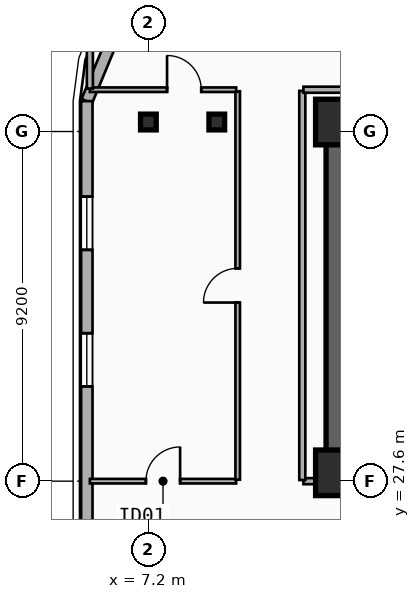
"""IFC4 building model, lengths in metres.
Left out: names, types, materials, properties, quantities, classifications, styles, units other than length and angle.
Written with IfcOpenShell. Run it as: python <this file> out.ifc"""

import sys

from ifc_helpers import new_model, si_unit, direction, frame, frame_2d, origin, origin_2d, place, context, subcontext, project, spatial, rectangle, i_section, extrude, element, fill, save


model = new_model("IFC4")
c1 = context("Model", 3, precision=1e-05, world=origin(), true_north=direction((0.0, 1.0)))
c2 = subcontext(c1, "Body", "Model", "MODEL_VIEW")
j1 = project(units=[si_unit("LENGTHUNIT", "METRE"), si_unit("PLANEANGLEUNIT", "RADIAN")], contexts=[c1])
p1 = place(None, origin())
s1 = spatial("IfcSite", under=j1, at=p1, CompositionType="ELEMENT")
p2 = place(p1, origin())
s2 = spatial("IfcBuilding", under=s1, at=p2, CompositionType="ELEMENT")
p3 = place(p2, frame((0.0, 0.0, 176.75)))
s3 = spatial("IfcBuildingStorey", under=s2, at=p3, CompositionType="ELEMENT", Elevation=176.75)
p4 = place(p3, frame((12.15, 37.05, 0.0), z_axis=(0.0, 0.0, 1.0), x_axis=(1.0, 0.0, 0.0)))
e1 = element("IfcWall", 1, at=p4, inside=s3, PredefinedType="SHEAR", context=c2, shape_type="SweptSolid", body=[
    extrude(rectangle(XDim=33.23, YDim=0.55, at=frame_2d((16.615, 0.0))), origin(), (0.0, 0.0, 1.0), 3.55),
])
p5 = place(p3, frame((21.18, 27.82, 0.0), z_axis=(0.0, 0.0, 1.0), x_axis=(-1.0, 0.0, 0.0)))
e2 = element("IfcWall", 2, at=p5, inside=s3, PredefinedType="SHEAR", context=c2, shape_type="SweptSolid", body=[
    extrude(rectangle(XDim=9.03, YDim=0.55, at=frame_2d((4.515, 0.0))), origin(), (0.0, 0.0, 1.0), 3.55),
])
p6 = place(p5, frame((2.68, 0.0, 0.0)))
e3 = element("IfcOpeningElement", 3, at=p6, cuts=e2, PredefinedType="OPENING", context=c2, shape_type="SweptSolid", body=[
    extrude(rectangle(XDim=1.1, YDim=2.15, at=frame_2d((0.55, 1.075))), frame((0.0, 0.285, 0.0), z_axis=(0.0, -1.0, 0.0), x_axis=(1.0, 0.0, 0.0)), (0.0, 0.0, 1.0), 0.57),
])
p7 = place(p3, frame((12.15, 28.095, 0.0), z_axis=(0.0, 0.0, 1.0), x_axis=(0.0, 1.0, 0.0)))
e4 = element("IfcWall", 4, at=p7, inside=s3, PredefinedType="SHEAR", context=c2, shape_type="SweptSolid", body=[
    extrude(rectangle(XDim=8.68, YDim=0.55, at=frame_2d((4.34, 0.0))), origin(), (0.0, 0.0, 1.0), 3.55),
])
for number, where, z_axis, x_axis in (
    (5, (12.2, 27.82, 0.0), (0.0, 0.0, 1.0), (1.0, 0.0, 0.0)),
    (6, (12.2, 37.05, 0.0), (0.0, 0.0, 1.0), (1.0, 0.0, 0.0)),
):
    element("IfcColumn", number, at=place(p3, frame(where, z_axis=z_axis, x_axis=x_axis)), inside=s3, PredefinedType="COLUMN", context=c2, shape_type="SweptSolid", body=[
        extrude(rectangle(XDim=1.2, YDim=1.2, at=origin_2d()), origin(), (0.0, 0.0, 1.0), 3.55),
    ])
for number, where, z_axis, x_axis in (
    (7, (9.0, 37.05, 0.0), (0.0, 0.0, 1.0), (1.0, 0.0, 0.0)),
    (8, (7.2, 37.05, 0.0), (0.0, 0.0, 1.0), (1.0, 0.0, 0.0)),
):
    element("IfcColumn", number, at=place(p3, frame(where, z_axis=z_axis, x_axis=x_axis)), inside=s3, PredefinedType="COLUMN", context=c2, shape_type="SweptSolid", body=[
        extrude(i_section(OverallWidth=0.413, OverallDepth=0.415, WebThickness=0.03, FlangeThickness=0.047, FilletRadius=0.015, at=origin_2d()), origin(), (0.0, 0.0, 1.0), 3.55),
    ])
p8 = place(p3, frame((5.58, 37.6, 0.0), z_axis=(0.0, 0.0, 1.0), x_axis=(0.382636798336, 0.92389884758, 0.0)))
e9 = element("IfcWall", 9, at=p8, inside=s3, PredefinedType="SOLIDWALL", context=c2, shape_type="SweptSolid", body=[
    extrude(rectangle(XDim=3.077, YDim=0.3, at=frame_2d((1.538, 0.0))), origin(), (0.0, 0.0, 1.0), 3.29),
])
p9 = place(p3, frame((5.58, 14.6, 0.0), z_axis=(0.0, 0.0, 1.0), x_axis=(0.0, 1.0, 0.0)))
e10 = element("IfcWall", 10, at=p9, inside=s3, PredefinedType="SOLIDWALL", context=c2, shape_type="SweptSolid", body=[
    extrude(rectangle(XDim=23.0, YDim=0.3, at=frame_2d((11.5, 0.0))), origin(), (0.0, 0.0, 1.0), 3.29),
])
p10 = place(p9, frame((15.493, 0.0, 0.34)))
e11 = element("IfcOpeningElement", 11, at=p10, cuts=e10, PredefinedType="OPENING", context=c2, shape_type="SweptSolid", body=[
    extrude(rectangle(XDim=1.4, YDim=2.1, at=frame_2d((0.7, 1.05))), frame((0.0, 0.16, 0.0), z_axis=(0.0, -1.0, 0.0), x_axis=(1.0, 0.0, 0.0)), (0.0, 0.0, 1.0), 0.32),
])
p11 = place(p9, frame((19.087, 0.0, 0.34)))
e12 = element("IfcOpeningElement", 12, at=p11, cuts=e10, PredefinedType="OPENING", context=c2, shape_type="SweptSolid", body=[
    extrude(rectangle(XDim=1.4, YDim=2.1, at=frame_2d((0.7, 1.05))), frame((0.0, 0.16, 0.0), z_axis=(0.0, -1.0, 0.0), x_axis=(1.0, 0.0, 0.0)), (0.0, 0.0, 1.0), 0.32),
])
p12 = place(p9, frame((2.83, 0.0, 0.34)))
e13 = element("IfcOpeningElement", 13, at=p12, cuts=e10, PredefinedType="OPENING", context=c2, shape_type="SweptSolid", body=[
    extrude(rectangle(XDim=1.4, YDim=2.1, at=frame_2d((0.7, 1.05))), frame((0.0, 0.16, 0.0), z_axis=(0.0, -1.0, 0.0), x_axis=(1.0, 0.0, 0.0)), (0.0, 0.0, 1.0), 0.32),
])
p13 = place(p9, frame((6.74, 0.0, 0.34)))
e14 = element("IfcOpeningElement", 14, at=p13, cuts=e10, PredefinedType="OPENING", context=c2, shape_type="SweptSolid", body=[
    extrude(rectangle(XDim=1.4, YDim=2.1, at=frame_2d((0.7, 1.05))), frame((0.0, 0.16, 0.0), z_axis=(0.0, -1.0, 0.0), x_axis=(1.0, 0.0, 0.0)), (0.0, 0.0, 1.0), 0.32),
])
p14 = place(p3, frame((5.66, 27.6, 0.0), z_axis=(0.0, 0.0, 1.0), x_axis=(1.0, 0.0, 0.0)))
e15 = element("IfcWall", 15, at=p14, inside=s3, PredefinedType="PARTITIONING", context=c2, shape_type="SweptSolid", body=[
    extrude(rectangle(XDim=3.85, YDim=0.12, at=frame_2d((1.925, 0.0))), origin(), (0.0, 0.0, 1.0), 2.62),
])
p15 = place(p14, frame((1.475, 0.0, 0.0)))
e16 = element("IfcOpeningElement", 16, at=p15, cuts=e15, PredefinedType="OPENING", context=c2, shape_type="SweptSolid", body=[
    extrude(rectangle(XDim=0.9, YDim=2.1, at=frame_2d((0.45, 1.05))), frame((0.0, 0.07, 0.0), z_axis=(0.0, -1.0, 0.0), x_axis=(1.0, 0.0, 0.0)), (0.0, 0.0, 1.0), 0.14),
])
p16 = place(p3, frame((9.55, 27.64, 0.0), z_axis=(0.0, 0.0, 1.0), x_axis=(0.0, 1.0, 0.0)))
e17 = element("IfcWall", 17, at=p16, inside=s3, PredefinedType="PARTITIONING", context=c2, shape_type="SweptSolid", body=[
    extrude(rectangle(XDim=10.22, YDim=0.12, at=frame_2d((5.11, 0.0))), origin(), (0.0, 0.0, 1.0), 2.77),
])
p17 = place(p16, frame((4.66, 0.0, 0.0)))
e18 = element("IfcOpeningElement", 18, at=p17, cuts=e17, PredefinedType="OPENING", context=c2, shape_type="SweptSolid", body=[
    extrude(rectangle(XDim=0.9, YDim=2.1, at=frame_2d((0.45, 1.05))), frame((0.0, 0.07, 0.0), z_axis=(0.0, -1.0, 0.0), x_axis=(1.0, 0.0, 0.0)), (0.0, 0.0, 1.0), 0.14),
])
p18 = place(p3, frame((5.66, 37.9, 0.0), z_axis=(0.0, 0.0, 1.0), x_axis=(1.0, 0.0, 0.0)))
e19 = element("IfcWall", 19, at=p18, inside=s3, PredefinedType="PARTITIONING", context=c2, shape_type="SweptSolid", body=[
    extrude(rectangle(XDim=3.85, YDim=0.12, at=frame_2d((1.925, 0.0))), origin(), (0.0, 0.0, 1.0), 3.29),
])
p19 = place(p18, frame((2.031, 0.0, 0.0)))
e20 = element("IfcOpeningElement", 20, at=p19, cuts=e19, PredefinedType="OPENING", context=c2, shape_type="SweptSolid", body=[
    extrude(rectangle(XDim=0.9, YDim=2.1, at=frame_2d((0.45, 1.05))), frame((0.0, 0.07, 0.0), z_axis=(0.0, -1.0, 0.0), x_axis=(1.0, 0.0, 0.0)), (0.0, 0.0, 1.0), 0.14),
])
p20 = place(p3, frame((11.28, 27.6, 0.0), z_axis=(0.0, 0.0, 1.0), x_axis=(1.0, 0.0, 0.0)))
e21 = element("IfcWall", 21, at=p20, inside=s3, PredefinedType="PARTITIONING", context=c2, shape_type="SweptSolid", body=[
    extrude(rectangle(XDim=0.84, YDim=0.16, at=frame_2d((0.42, 0.0))), origin(), (0.0, 0.0, 1.0), 2.36),
])
p21 = place(p3, frame((11.25, 27.63, 0.0), z_axis=(0.0, 0.0, 1.0), x_axis=(0.0, 1.0, 0.0)))
e22 = element("IfcWall", 22, at=p21, inside=s3, PredefinedType="PARTITIONING", context=c2, shape_type="SweptSolid", body=[
    extrude(rectangle(XDim=10.24, YDim=0.16, at=frame_2d((5.12, 0.0))), origin(), (0.0, 0.0, 1.0), 2.77),
])
p22 = place(p3, frame((11.28, 37.9, 0.0), z_axis=(0.0, 0.0, 1.0), x_axis=(1.0, 0.0, 0.0)))
e23 = element("IfcWall", 23, at=p22, inside=s3, PredefinedType="PARTITIONING", context=c2, shape_type="SweptSolid", body=[
    extrude(rectangle(XDim=35.04, YDim=0.16, at=frame_2d((17.52, 0.0))), origin(), (0.0, 0.0, 1.0), 3.29),
])
p23 = place(p3, frame((5.66, 37.93, 0.0), z_axis=(0.0, 0.0, 1.0), x_axis=(0.0, 1.0, 0.0)))
e24 = element("IfcWall", 24, at=p23, inside=s3, PredefinedType="PARTITIONING", context=c2, shape_type="SweptSolid", body=[
    extrude(rectangle(XDim=1.44, YDim=0.16, at=frame_2d((0.72, 0.0))), origin(), (0.0, 0.0, 1.0), 3.29),
])
p24 = place(p10, origin())
e25 = element("IfcWindow", 25, at=p24, inside=s3, PartitioningType="SINGLE_PANEL", PredefinedType="WINDOW", context=c2, shape_type="SweptSolid", body=[
    extrude(rectangle(XDim=1.4, YDim=2.1, at=frame_2d((0.7, 1.05))), frame((0.0, 0.03, 0.0), z_axis=(0.0, -1.0, 0.0), x_axis=(1.0, 0.0, 0.0)), (0.0, 0.0, 1.0), 0.06),
])
fill(e11, e25)
p25 = place(p11, origin())
e26 = element("IfcWindow", 26, at=p25, inside=s3, PartitioningType="SINGLE_PANEL", PredefinedType="WINDOW", context=c2, shape_type="SweptSolid", body=[
    extrude(rectangle(XDim=1.4, YDim=2.1, at=frame_2d((0.7, 1.05))), frame((0.0, 0.03, 0.0), z_axis=(0.0, -1.0, 0.0), x_axis=(1.0, 0.0, 0.0)), (0.0, 0.0, 1.0), 0.06),
])
fill(e12, e26)
p26 = place(p15, origin())
e27 = element("IfcDoor", 27, at=p26, inside=s3, OperationType="SINGLE_SWING_RIGHT", PredefinedType="DOOR", context=c2, shape_type="SweptSolid", body=[
    extrude(rectangle(XDim=0.9, YDim=2.1, at=frame_2d((0.45, 1.05))), frame((0.0, 0.025, 0.0), z_axis=(0.0, -1.0, 0.0), x_axis=(1.0, 0.0, 0.0)), (0.0, 0.0, 1.0), 0.05),
])
fill(e16, e27)
p27 = place(p17, origin())
e28 = element("IfcDoor", 28, at=p27, inside=s3, OperationType="SINGLE_SWING_LEFT", PredefinedType="DOOR", context=c2, shape_type="SweptSolid", body=[
    extrude(rectangle(XDim=0.9, YDim=2.1, at=frame_2d((0.45, 1.05))), frame((0.0, 0.025, 0.0), z_axis=(0.0, -1.0, 0.0), x_axis=(1.0, 0.0, 0.0)), (0.0, 0.0, 1.0), 0.05),
])
fill(e18, e28)
p28 = place(p19, origin())
e29 = element("IfcDoor", 29, at=p28, inside=s3, OperationType="SINGLE_SWING_LEFT", PredefinedType="DOOR", context=c2, shape_type="SweptSolid", body=[
    extrude(rectangle(XDim=0.9, YDim=2.1, at=frame_2d((0.45, 1.05))), frame((0.0, 0.025, 0.0), z_axis=(0.0, -1.0, 0.0), x_axis=(1.0, 0.0, 0.0)), (0.0, 0.0, 1.0), 0.05),
])
fill(e20, e29)
save(model, sys.argv[1])
